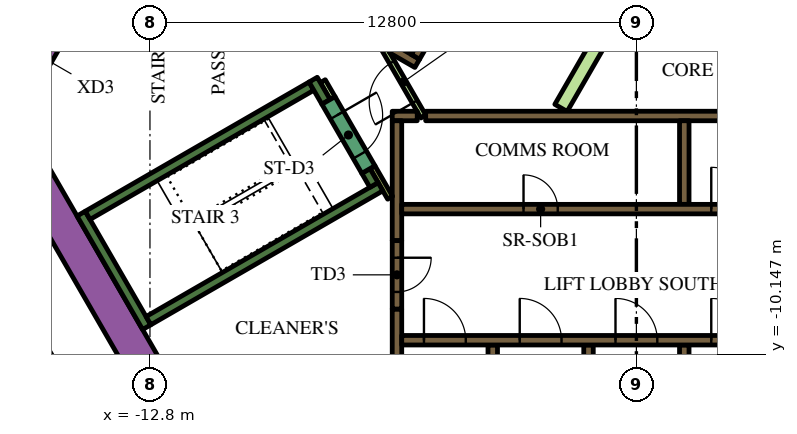
"""IFC4 building model, lengths in metres.
Left out: names, types, materials, properties, quantities, classifications, styles, units other than length and angle.
Written with IfcOpenShell. Run it as: python <this file> out.ifc"""

import sys

from ifc_helpers import new_model, si_unit, direction, frame, frame_2d, origin, place, context, subcontext, project, spatial, polyline, rectangle, outline, extrude, element, fill, save


model = new_model("IFC4")
c1 = context("Model", 3, precision=1e-05, world=origin(), true_north=direction((0.0, 1.0)))
c2 = subcontext(c1, "Body", "Model", "MODEL_VIEW")
j1 = project(units=[si_unit("LENGTHUNIT", "METRE"), si_unit("PLANEANGLEUNIT", "RADIAN")], contexts=[c1])
p1 = place(None, origin())
s1 = spatial("IfcSite", under=j1, at=p1, CompositionType="ELEMENT")
p2 = place(p1, origin())
s2 = spatial("IfcBuilding", under=s1, at=p2, CompositionType="ELEMENT")
p3 = place(p2, frame((0.0, 0.0, 103.2)))
s3 = spatial("IfcBuildingStorey", under=s2, at=p3, CompositionType="ELEMENT", Elevation=103.2)
p4 = place(p3, frame((-12.134, -11.883, 0.0), z_axis=(0.0, 0.0, 1.0), x_axis=(-0.500005339912, 0.866022320763, 0.0)))
e1 = element("IfcWall", 1, at=p4, inside=s3, PredefinedType="SOLIDWALL", context=c2, shape_type="SweptSolid", body=[
    extrude(rectangle(XDim=9.488, YDim=0.9, at=frame_2d((4.744, 0.0))), origin(), (0.0, 0.0, 1.0), 3.9),
])
p5 = place(p3, frame((-12.885, -9.431, 0.0), z_axis=(0.0, 0.0, 1.0), x_axis=(-0.500020560727, 0.866013532718, 0.0)))
e2 = element("IfcWall", 2, at=p5, inside=s3, PredefinedType="SOLIDWALL", context=c2, shape_type="SweptSolid", body=[
    extrude(rectangle(XDim=3.45, YDim=0.25, at=frame_2d((1.725, 0.0))), origin(), (0.0, 0.0, 1.0), 3.9),
])
p6 = place(p3, frame((-14.44, -6.49, 0.0), z_axis=(0.0, 0.0, 1.0), x_axis=(0.866022966069, 0.500004222222, 0.0)))
e3 = element("IfcWall", 3, at=p6, inside=s3, PredefinedType="SOLIDWALL", context=c2, shape_type="SweptSolid", body=[
    extrude(rectangle(XDim=6.8, YDim=0.25, at=frame_2d((3.4, 0.0))), origin(), (0.0, 0.0, 1.0), 3.9),
])
p7 = place(p3, frame((-8.168, -3.503, 0.0), z_axis=(0.0, 0.0, 1.0), x_axis=(-0.499952099219, 0.866053057547, 0.0)))
e4 = element("IfcWall", 4, at=p7, inside=s3, PredefinedType="SOLIDWALL", context=c2, shape_type="SweptSolid", body=[
    extrude(rectangle(XDim=0.675, YDim=0.25, at=frame_2d((0.337, 0.0))), origin(), (0.0, 0.0, 1.0), 3.9),
])
p8 = place(p3, frame((-12.84, -9.261, 0.0), z_axis=(0.0, 0.0, 1.0), x_axis=(0.866016039709, 0.500016218704, 0.0)))
e5 = element("IfcWall", 5, at=p8, inside=s3, PredefinedType="SOLIDWALL", context=c2, shape_type="SweptSolid", body=[
    extrude(rectangle(XDim=7.05, YDim=0.25, at=frame_2d((3.525, 0.0))), origin(), (0.0, 0.0, 1.0), 3.9),
])
p9 = place(p3, frame((-6.905, -5.69, 0.0), z_axis=(0.0, 0.0, 1.0), x_axis=(-0.500402024738, 0.865793170242, 0.0)))
e6 = element("IfcWall", 6, at=p9, inside=s3, PredefinedType="SOLIDWALL", context=c2, shape_type="SweptSolid", body=[
    extrude(rectangle(XDim=0.425, YDim=0.25, at=frame_2d((0.212, 0.0))), origin(), (0.0, 0.0, 1.0), 3.9),
])
p10 = place(p3, frame((-3.78, -12.1, 0.0), z_axis=(0.0, 0.0, 1.0), x_axis=(0.0, 1.0, 0.0)))
e7 = element("IfcWall", 7, at=p10, inside=s3, PredefinedType="SOLIDWALL", context=c2, shape_type="SweptSolid", body=[
    extrude(rectangle(XDim=2.2, YDim=0.25, at=frame_2d((1.1, 0.0))), origin(), (0.0, 0.0, 1.0), 3.9),
])
p11 = place(p3, frame((-6.3, -12.1, 0.0), z_axis=(0.0, 0.0, 1.0), x_axis=(0.0, 1.0, 0.0)))
e8 = element("IfcWall", 8, at=p11, inside=s3, PredefinedType="SOLIDWALL", context=c2, shape_type="SweptSolid", body=[
    extrude(rectangle(XDim=3.146, YDim=0.25, at=frame_2d((1.573, 0.0))), origin(), (0.0, 0.0, 1.0), 3.9),
])
p12 = place(p3, frame((-5.545, -3.875, 0.0), z_axis=(0.0, 0.0, 1.0), x_axis=(1.0, 0.0, 0.0)))
e9 = element("IfcWall", 9, at=p12, inside=s3, PredefinedType="SOLIDWALL", context=c2, shape_type="SweptSolid", body=[
    extrude(rectangle(XDim=11.97, YDim=0.25, at=frame_2d((5.985, 0.0))), origin(), (0.0, 0.0, 1.0), 3.9),
])
p13 = place(p3, frame((-6.425, -3.875, 0.0), z_axis=(0.0, 0.0, 1.0), x_axis=(1.0, 0.0, 0.0)))
e10 = element("IfcWall", 10, at=p13, inside=s3, PredefinedType="SOLIDWALL", context=c2, shape_type="SweptSolid", body=[
    extrude(rectangle(XDim=0.658, YDim=0.25, at=frame_2d((0.329, 0.0))), origin(), (0.0, 0.0, 1.0), 3.9),
])
p14 = place(p3, frame((1.26, -4.0, 0.0), z_axis=(0.0, 0.0, 1.0), x_axis=(0.0, -1.0, 0.0)))
e11 = element("IfcWall", 11, at=p14, inside=s3, PredefinedType="SOLIDWALL", context=c2, shape_type="SweptSolid", body=[
    extrude(rectangle(XDim=2.2, YDim=0.25, at=frame_2d((1.1, 0.0))), origin(), (0.0, 0.0, 1.0), 3.9),
])
p15 = place(p3, frame((-6.3, -4.0, 0.0), z_axis=(0.0, 0.0, 1.0), x_axis=(0.0, -1.0, 0.0)))
e12 = element("IfcWall", 12, at=p15, inside=s3, PredefinedType="SOLIDWALL", context=c2, shape_type="SweptSolid", body=[
    extrude(rectangle(XDim=3.154, YDim=0.25, at=frame_2d((1.577, 0.0))), origin(), (0.0, 0.0, 1.0), 3.9),
])
for number, where, z_axis, x_axis in (
    (13, (1.26, -12.1, 0.0), (0.0, 0.0, 1.0), (0.0, 1.0, 0.0)),
    (14, (-1.26, -12.1, 0.0), (0.0, 0.0, 1.0), (0.0, 1.0, 0.0)),
):
    element("IfcWall", number, at=place(p3, frame(where, z_axis=z_axis, x_axis=x_axis)), inside=s3, PredefinedType="SOLIDWALL", context=c2, shape_type="SweptSolid", body=[
        extrude(rectangle(XDim=2.2, YDim=0.25, at=frame_2d((1.1, 0.0))), origin(), (0.0, 0.0, 1.0), 3.9),
    ])
p16 = place(p3, origin())
e15 = element("IfcWall", 15, at=p16, inside=s3, PredefinedType="SOLIDWALL", context=c2, shape_type="SweptSolid", body=[
    extrude(outline(polyline([(0.566, 6.725), (0.566, 6.875), (0.566, 6.875), (0.565, 6.875), (0.361, 6.875), (0.035, 7.439), (0.252, 7.564), (0.377, 7.348), (6.552, -3.348), (6.677, -3.564), (6.46, -3.689), (0.448, 6.725), (0.565, 6.725), (0.566, 6.725), (0.566, 6.725)])), origin(), (0.0, 0.0, 1.0), 3.9),
])
e16 = element("IfcWall", 16, at=p16, inside=s3, PredefinedType="SOLIDWALL", context=c2, shape_type="SweptSolid", body=[
    extrude(outline(polyline([(-5.922, -2.257), (-5.922, -2.257), (-5.705, -2.382), (-5.83, -2.598), (-6.483, -2.221), (-6.591, -2.033), (-6.591, -2.033), (-6.7, -2.096), (-7.952, -1.373), (-7.827, -1.156), (-5.922, -2.257)])), origin(), (0.0, 0.0, 1.0), 3.9),
])
p17 = place(p3, frame((-6.48, -6.027, 0.0), z_axis=(0.0, 0.0, 1.0), x_axis=(-0.499927229454, 0.866067413802, 0.0)))
e17 = element("IfcWall", 17, at=p17, inside=s3, PredefinedType="PARTITIONING", context=c2, shape_type="SweptSolid", body=[
    extrude(rectangle(XDim=0.929, YDim=0.15, at=frame_2d((0.464, 0.0))), origin(), (0.0, 0.0, 1.0), 3.9),
])
p18 = place(p3, frame((-8.252, -2.958, 0.0), z_axis=(0.0, 0.0, 1.0), x_axis=(0.500174715838, -0.865924508047, 0.0)))
e18 = element("IfcWall", 18, at=p18, inside=s3, PredefinedType="PARTITIONING", context=c2, shape_type="SweptSolid", body=[
    extrude(rectangle(XDim=0.514, YDim=0.15, at=frame_2d((0.257, 0.0))), origin(), (0.0, 0.0, 1.0), 2.75),
])
e19 = element("IfcWall", 19, at=p16, inside=s3, PredefinedType="PARTITIONING", context=c2, shape_type="SweptSolid", body=[
    extrude(outline(polyline([(-0.59, -0.872), (-0.265, -1.059), (-1.822, -3.756), (-2.147, -3.568), (-0.59, -0.872)])), origin(), (0.0, 0.0, 1.0), 2.75),
])
p19 = place(p3, frame((-6.175, -9.775, 0.0), z_axis=(0.0, 0.0, 1.0), x_axis=(1.0, 0.0, 0.0)))
e20 = element("IfcWall", 20, at=p19, inside=s3, PredefinedType="SOLIDWALL", context=c2, shape_type="SweptSolid", body=[
    extrude(rectangle(XDim=12.35, YDim=0.25, at=frame_2d((6.175, 0.0))), origin(), (0.0, 0.0, 1.0), 3.9),
])
p20 = place(p19, frame((0.585, 0.0, 0.0)))
e21 = element("IfcOpeningElement", 21, at=p20, cuts=e20, PredefinedType="OPENING", context=c2, shape_type="SweptSolid", body=[
    extrude(rectangle(XDim=1.1, YDim=2.1, at=frame_2d((0.55, 1.05))), frame((0.0, 0.135, 0.0), z_axis=(0.0, -1.0, 0.0), x_axis=(1.0, 0.0, 0.0)), (0.0, 0.0, 1.0), 0.27),
])
p21 = place(p19, frame((3.105, 0.0, 0.0)))
e22 = element("IfcOpeningElement", 22, at=p21, cuts=e20, PredefinedType="OPENING", context=c2, shape_type="SweptSolid", body=[
    extrude(rectangle(XDim=1.1, YDim=2.1, at=frame_2d((0.55, 1.05))), frame((0.0, 0.135, 0.0), z_axis=(0.0, -1.0, 0.0), x_axis=(1.0, 0.0, 0.0)), (0.0, 0.0, 1.0), 0.27),
])
p22 = place(p19, frame((5.625, 0.0, 0.0)))
e23 = element("IfcOpeningElement", 23, at=p22, cuts=e20, PredefinedType="OPENING", context=c2, shape_type="SweptSolid", body=[
    extrude(rectangle(XDim=1.1, YDim=2.1, at=frame_2d((0.55, 1.05))), frame((0.0, 0.135, 0.0), z_axis=(0.0, -1.0, 0.0), x_axis=(1.0, 0.0, 0.0)), (0.0, 0.0, 1.0), 0.27),
])
p23 = place(p19, frame((8.145, 0.0, 0.0)))
e24 = element("IfcOpeningElement", 24, at=p23, cuts=e20, PredefinedType="OPENING", context=c2, shape_type="SweptSolid", body=[
    extrude(rectangle(XDim=1.1, YDim=2.1, at=frame_2d((0.55, 1.05))), frame((0.0, 0.135, 0.0), z_axis=(0.0, -1.0, 0.0), x_axis=(1.0, 0.0, 0.0)), (0.0, 0.0, 1.0), 0.27),
])
p24 = place(p19, frame((10.665, 0.0, 0.0)))
e25 = element("IfcOpeningElement", 25, at=p24, cuts=e20, PredefinedType="OPENING", context=c2, shape_type="SweptSolid", body=[
    extrude(rectangle(XDim=1.1, YDim=2.1, at=frame_2d((0.55, 1.05))), frame((0.0, 0.135, 0.0), z_axis=(0.0, -1.0, 0.0), x_axis=(1.0, 0.0, 0.0)), (0.0, 0.0, 1.0), 0.27),
])
p25 = place(p3, frame((-6.175, -6.325, 0.0), z_axis=(0.0, 0.0, 1.0), x_axis=(1.0, 0.0, 0.0)))
e26 = element("IfcWall", 26, at=p25, inside=s3, PredefinedType="SOLIDWALL", context=c2, shape_type="SweptSolid", body=[
    extrude(rectangle(XDim=12.35, YDim=0.25, at=frame_2d((6.175, 0.0))), origin(), (0.0, 0.0, 1.0), 3.9),
])
p26 = place(p25, frame((3.205, 0.0, 0.0)))
e27 = element("IfcOpeningElement", 27, at=p26, cuts=e26, PredefinedType="OPENING", context=c2, shape_type="SweptSolid", body=[
    extrude(rectangle(XDim=0.9, YDim=2.1, at=frame_2d((0.45, 1.05))), frame((0.0, 0.135, 0.0), z_axis=(0.0, -1.0, 0.0), x_axis=(1.0, 0.0, 0.0)), (0.0, 0.0, 1.0), 0.27),
])
p27 = place(p25, frame((8.145, 0.0, 0.0)))
e28 = element("IfcOpeningElement", 28, at=p27, cuts=e26, PredefinedType="OPENING", context=c2, shape_type="SweptSolid", body=[
    extrude(rectangle(XDim=1.1, YDim=2.1, at=frame_2d((0.55, 1.05))), frame((0.0, 0.135, 0.0), z_axis=(0.0, -1.0, 0.0), x_axis=(1.0, 0.0, 0.0)), (0.0, 0.0, 1.0), 0.27),
])
p28 = place(p25, frame((10.665, 0.0, 0.0)))
e29 = element("IfcOpeningElement", 29, at=p28, cuts=e26, PredefinedType="OPENING", context=c2, shape_type="SweptSolid", body=[
    extrude(rectangle(XDim=1.1, YDim=2.1, at=frame_2d((0.55, 1.05))), frame((0.0, 0.135, 0.0), z_axis=(0.0, -1.0, 0.0), x_axis=(1.0, 0.0, 0.0)), (0.0, 0.0, 1.0), 0.27),
])
p29 = place(p3, frame((-0.898, 6.194, 0.0), z_axis=(0.0, 0.0, 1.0), x_axis=(-0.499996202215, -0.866027596426, 0.0)))
e30 = element("IfcWall", 30, at=p29, inside=s3, PredefinedType="SOLIDWALL", context=c2, shape_type="SweptSolid", body=[
    extrude(rectangle(XDim=9.83, YDim=0.25, at=frame_2d((4.915, 0.0))), origin(), (0.0, 0.0, 1.0), 3.9),
])
p30 = place(p29, frame((0.585, 0.0, 0.0)))
e31 = element("IfcOpeningElement", 31, at=p30, cuts=e30, PredefinedType="OPENING", context=c2, shape_type="SweptSolid", body=[
    extrude(rectangle(XDim=1.1, YDim=2.1, at=frame_2d((0.55, 1.05))), frame((0.0, 0.135, 0.0), z_axis=(0.0, -1.0, 0.0), x_axis=(1.0, 0.0, 0.0)), (0.0, 0.0, 1.0), 0.27),
])
p31 = place(p29, frame((3.105, 0.0, 0.0)))
e32 = element("IfcOpeningElement", 32, at=p31, cuts=e30, PredefinedType="OPENING", context=c2, shape_type="SweptSolid", body=[
    extrude(rectangle(XDim=1.1, YDim=2.1, at=frame_2d((0.55, 1.05))), frame((0.0, 0.135, 0.0), z_axis=(0.0, -1.0, 0.0), x_axis=(1.0, 0.0, 0.0)), (0.0, 0.0, 1.0), 0.27),
])
p32 = place(p29, frame((5.625, 0.0, 0.0)))
e33 = element("IfcOpeningElement", 33, at=p32, cuts=e30, PredefinedType="OPENING", context=c2, shape_type="SweptSolid", body=[
    extrude(rectangle(XDim=1.1, YDim=2.1, at=frame_2d((0.55, 1.05))), frame((0.0, 0.135, 0.0), z_axis=(0.0, -1.0, 0.0), x_axis=(1.0, 0.0, 0.0)), (0.0, 0.0, 1.0), 0.27),
])
p33 = place(p29, frame((8.145, 0.0, 0.0)))
e34 = element("IfcOpeningElement", 34, at=p33, cuts=e30, PredefinedType="OPENING", context=c2, shape_type="SweptSolid", body=[
    extrude(rectangle(XDim=1.1, YDim=2.1, at=frame_2d((0.55, 1.05))), frame((0.0, 0.135, 0.0), z_axis=(0.0, -1.0, 0.0), x_axis=(1.0, 0.0, 0.0)), (0.0, 0.0, 1.0), 0.27),
])
p34 = place(p3, frame((-8.103, -3.466, 0.0), z_axis=(0.0, 0.0, 1.0), x_axis=(0.500078061341, -0.865980330357, 0.0)))
e35 = element("IfcWall", 35, at=p34, inside=s3, PredefinedType="SOLIDWALL", context=c2, shape_type="SweptSolid", body=[
    extrude(rectangle(XDim=2.1, YDim=0.4, at=frame_2d((1.05, 0.0))), origin(), (0.0, 0.0, 1.0), 3.9),
])
p35 = place(p34, frame((0.45, 0.0, 0.0)))
e36 = element("IfcOpeningElement", 36, at=p35, cuts=e35, PredefinedType="OPENING", context=c2, shape_type="SweptSolid", body=[
    extrude(rectangle(XDim=1.2, YDim=2.1, at=frame_2d((0.6, 1.05))), frame((0.0, 0.21, 0.0), z_axis=(0.0, -1.0, 0.0), x_axis=(1.0, 0.0, 0.0)), (0.0, 0.0, 1.0), 0.42),
])
p36 = place(p3, frame((-6.3, -7.154, 0.0), z_axis=(0.0, 0.0, 1.0), x_axis=(0.0, -1.0, 0.0)))
e37 = element("IfcWall", 37, at=p36, inside=s3, PredefinedType="SOLIDWALL", context=c2, shape_type="SweptSolid", body=[
    extrude(rectangle(XDim=1.8, YDim=0.25, at=frame_2d((0.9, 0.0))), origin(), (0.0, 0.0, 1.0), 3.9),
])
p37 = place(p36, frame((0.45, 0.0, 0.0)))
e38 = element("IfcOpeningElement", 38, at=p37, cuts=e37, PredefinedType="OPENING", context=c2, shape_type="SweptSolid", body=[
    extrude(rectangle(XDim=0.9, YDim=2.1, at=frame_2d((0.45, 1.05))), frame((0.0, 0.135, 0.0), z_axis=(0.0, -1.0, 0.0), x_axis=(1.0, 0.0, 0.0)), (0.0, 0.0, 1.0), 0.27),
])
p38 = place(p3, frame((-5.606, -3.89, 0.0), z_axis=(0.0, 0.0, 1.0), x_axis=(-0.500027713859, 0.866009402589, 0.0)))
e39 = element("IfcWall", 39, at=p38, inside=s3, PredefinedType="PARTITIONING", context=c2, shape_type="SweptSolid", body=[
    extrude(rectangle(XDim=2.1, YDim=0.15, at=frame_2d((1.05, 0.0))), origin(), (0.0, 0.0, 1.0), 2.75),
])
p39 = place(p38, frame((0.45, 0.0, 0.0)))
e40 = element("IfcOpeningElement", 40, at=p39, cuts=e39, PredefinedType="OPENING", context=c2, shape_type="SweptSolid", body=[
    extrude(rectangle(XDim=1.2, YDim=2.1, at=frame_2d((0.6, 1.05))), frame((0.0, 0.085, 0.0), z_axis=(0.0, -1.0, 0.0), x_axis=(1.0, 0.0, 0.0)), (0.0, 0.0, 1.0), 0.17),
])
p40 = place(p3, frame((-16.209, -2.976, 0.0), z_axis=(0.0, 0.0, 1.0), x_axis=(0.499954529098, 0.86605165483, 0.0)))
e41 = element("IfcWall", 41, at=p40, inside=s3, PredefinedType="SOLIDWALL", context=c2, shape_type="SweptSolid", body=[
    extrude(rectangle(XDim=1.7, YDim=0.9, at=frame_2d((0.85, 0.0))), origin(), (0.0, 0.0, 1.0), 3.9),
])
p41 = place(p40, frame((0.25, 0.0, 0.0)))
e42 = element("IfcOpeningElement", 42, at=p41, cuts=e41, PredefinedType="OPENING", context=c2, shape_type="SweptSolid", body=[
    extrude(rectangle(XDim=1.2, YDim=2.1, at=frame_2d((0.6, 1.05))), frame((0.0, 0.46, 0.0), z_axis=(0.0, -1.0, 0.0), x_axis=(1.0, 0.0, 0.0)), (0.0, 0.0, 1.0), 0.92),
])
p42 = place(p3, frame((-19.081, -3.9, 0.0), z_axis=(0.0, 0.0, 1.0), x_axis=(0.499998313975, 0.866026377209, 0.0)))
e43 = element("IfcWall", 43, at=p42, inside=s3, PredefinedType="PARTITIONING", context=c2, shape_type="SweptSolid", body=[
    extrude(rectangle(XDim=25.766, YDim=0.15, at=frame_2d((12.883, 0.0))), origin(), (0.0, 0.0, 1.0), 2.75),
])
p43 = place(p42, frame((19.306, 0.0, 0.0)))
e44 = element("IfcOpeningElement", 44, at=p43, cuts=e43, PredefinedType="OPENING", context=c2, shape_type="SweptSolid", body=[
    extrude(rectangle(XDim=1.0, YDim=2.1, at=frame_2d((0.5, 1.05))), frame((0.0, 0.085, 0.0), z_axis=(0.0, -1.0, 0.0), x_axis=(1.0, 0.0, 0.0)), (0.0, 0.0, 1.0), 0.17),
])
p44 = place(p42, frame((17.144, 0.0, 0.0)))
e45 = element("IfcOpeningElement", 45, at=p44, cuts=e43, PredefinedType="OPENING", context=c2, shape_type="SweptSolid", body=[
    extrude(rectangle(XDim=0.9, YDim=2.1, at=frame_2d((0.45, 1.05))), frame((0.0, 0.085, 0.0), z_axis=(0.0, -1.0, 0.0), x_axis=(1.0, 0.0, 0.0)), (0.0, 0.0, 1.0), 0.17),
])
p45 = place(p42, frame((9.955, 0.0, 0.0)))
e46 = element("IfcOpeningElement", 46, at=p45, cuts=e43, PredefinedType="OPENING", context=c2, shape_type="SweptSolid", body=[
    extrude(rectangle(XDim=1.1, YDim=2.1, at=frame_2d((0.55, 1.05))), frame((0.0, 0.085, 0.0), z_axis=(0.0, -1.0, 0.0), x_axis=(1.0, 0.0, 0.0)), (0.0, 0.0, 1.0), 0.17),
])
p46 = place(p42, frame((8.648, 0.0, 0.0)))
e47 = element("IfcOpeningElement", 47, at=p46, cuts=e43, PredefinedType="OPENING", context=c2, shape_type="SweptSolid", body=[
    extrude(rectangle(XDim=1.0, YDim=2.1, at=frame_2d((0.5, 1.05))), frame((0.0, 0.085, 0.0), z_axis=(0.0, -1.0, 0.0), x_axis=(1.0, 0.0, 0.0)), (0.0, 0.0, 1.0), 0.17),
])
p47 = place(p42, frame((1.553, 0.0, 0.0)))
e48 = element("IfcOpeningElement", 48, at=p47, cuts=e43, PredefinedType="OPENING", context=c2, shape_type="SweptSolid", body=[
    extrude(rectangle(XDim=0.9, YDim=2.1, at=frame_2d((0.45, 1.05))), frame((0.0, 0.085, 0.0), z_axis=(0.0, -1.0, 0.0), x_axis=(1.0, 0.0, 0.0)), (0.0, 0.0, 1.0), 0.17),
])
p48 = place(p3, frame((-12.918, -14.575, 0.0), z_axis=(0.0, 0.0, 1.0), x_axis=(-0.500009150678, 0.866020120573, 0.0)))
e49 = element("IfcWall", 49, at=p48, inside=s3, PredefinedType="PARTITIONING", context=c2, shape_type="SweptSolid", body=[
    extrude(rectangle(XDim=5.258, YDim=0.15, at=frame_2d((2.629, 0.0))), origin(), (0.0, 0.0, 1.0), 2.75),
])
p49 = place(p48, frame((0.18, 0.0, 0.0)))
e50 = element("IfcOpeningElement", 50, at=p49, cuts=e49, PredefinedType="OPENING", context=c2, shape_type="SweptSolid", body=[
    extrude(rectangle(XDim=1.0, YDim=2.1, at=frame_2d((0.5, 1.05))), frame((0.0, 0.085, 0.0), z_axis=(0.0, -1.0, 0.0), x_axis=(1.0, 0.0, 0.0)), (0.0, 0.0, 1.0), 0.17),
])
p50 = place(p20, origin())
e51 = element("IfcDoor", 51, at=p50, inside=s3, OperationType="DOUBLE_DOOR_SLIDING", PredefinedType="DOOR", context=c2, shape_type="SweptSolid", body=[
    extrude(rectangle(XDim=1.1, YDim=2.1, at=frame_2d((0.55, 1.05))), frame((0.0, 0.025, 0.0), z_axis=(0.0, -1.0, 0.0), x_axis=(1.0, 0.0, 0.0)), (0.0, 0.0, 1.0), 0.05),
])
fill(e21, e51)
p51 = place(p21, origin())
e52 = element("IfcDoor", 52, at=p51, inside=s3, OperationType="DOUBLE_DOOR_SLIDING", PredefinedType="DOOR", context=c2, shape_type="SweptSolid", body=[
    extrude(rectangle(XDim=1.1, YDim=2.1, at=frame_2d((0.55, 1.05))), frame((0.0, 0.025, 0.0), z_axis=(0.0, -1.0, 0.0), x_axis=(1.0, 0.0, 0.0)), (0.0, 0.0, 1.0), 0.05),
])
fill(e22, e52)
p52 = place(p22, origin())
e53 = element("IfcDoor", 53, at=p52, inside=s3, OperationType="DOUBLE_DOOR_SLIDING", PredefinedType="DOOR", context=c2, shape_type="SweptSolid", body=[
    extrude(rectangle(XDim=1.1, YDim=2.1, at=frame_2d((0.55, 1.05))), frame((0.0, 0.025, 0.0), z_axis=(0.0, -1.0, 0.0), x_axis=(1.0, 0.0, 0.0)), (0.0, 0.0, 1.0), 0.05),
])
fill(e23, e53)
p53 = place(p23, origin())
e54 = element("IfcDoor", 54, at=p53, inside=s3, OperationType="DOUBLE_DOOR_SLIDING", PredefinedType="DOOR", context=c2, shape_type="SweptSolid", body=[
    extrude(rectangle(XDim=1.1, YDim=2.1, at=frame_2d((0.55, 1.05))), frame((0.0, 0.025, 0.0), z_axis=(0.0, -1.0, 0.0), x_axis=(1.0, 0.0, 0.0)), (0.0, 0.0, 1.0), 0.05),
])
fill(e24, e54)
p54 = place(p26, origin())
e55 = element("IfcDoor", 55, at=p54, inside=s3, OperationType="SINGLE_SWING_LEFT", PredefinedType="DOOR", context=c2, shape_type="SweptSolid", body=[
    extrude(rectangle(XDim=0.9, YDim=2.1, at=frame_2d((0.45, 1.05))), frame((0.0, 0.025, 0.0), z_axis=(0.0, -1.0, 0.0), x_axis=(1.0, 0.0, 0.0)), (0.0, 0.0, 1.0), 0.05),
])
fill(e27, e55)
p55 = place(p27, origin())
e56 = element("IfcDoor", 56, at=p55, inside=s3, OperationType="DOUBLE_DOOR_SLIDING", PredefinedType="DOOR", context=c2, shape_type="SweptSolid", body=[
    extrude(rectangle(XDim=1.1, YDim=2.1, at=frame_2d((0.55, 1.05))), frame((0.0, 0.025, 0.0), z_axis=(0.0, -1.0, 0.0), x_axis=(1.0, 0.0, 0.0)), (0.0, 0.0, 1.0), 0.05),
])
fill(e28, e56)
p56 = place(p35, origin())
e57 = element("IfcDoor", 57, at=p56, inside=s3, OperationType="SINGLE_SWING_LEFT", PredefinedType="DOOR", context=c2, shape_type="SweptSolid", body=[
    extrude(rectangle(XDim=1.2, YDim=2.1, at=frame_2d((0.6, 1.05))), frame((0.0, 0.025, 0.0), z_axis=(0.0, -1.0, 0.0), x_axis=(1.0, 0.0, 0.0)), (0.0, 0.0, 1.0), 0.05),
])
fill(e36, e57)
p57 = place(p37, origin())
e58 = element("IfcDoor", 58, at=p57, inside=s3, OperationType="SINGLE_SWING_LEFT", PredefinedType="DOOR", context=c2, shape_type="SweptSolid", body=[
    extrude(rectangle(XDim=0.9, YDim=2.1, at=frame_2d((0.45, 1.05))), frame((0.0, 0.025, 0.0), z_axis=(0.0, -1.0, 0.0), x_axis=(1.0, 0.0, 0.0)), (0.0, 0.0, 1.0), 0.05),
])
fill(e38, e58)
p58 = place(p39, origin())
e59 = element("IfcDoor", 59, at=p58, inside=s3, OperationType="SINGLE_SWING_LEFT", PredefinedType="DOOR", context=c2, shape_type="SweptSolid", body=[
    extrude(rectangle(XDim=1.2, YDim=2.1, at=frame_2d((0.6, 1.05))), frame((0.0, 0.025, 0.0), z_axis=(0.0, -1.0, 0.0), x_axis=(1.0, 0.0, 0.0)), (0.0, 0.0, 1.0), 0.05),
])
fill(e40, e59)
save(model, sys.argv[1])
